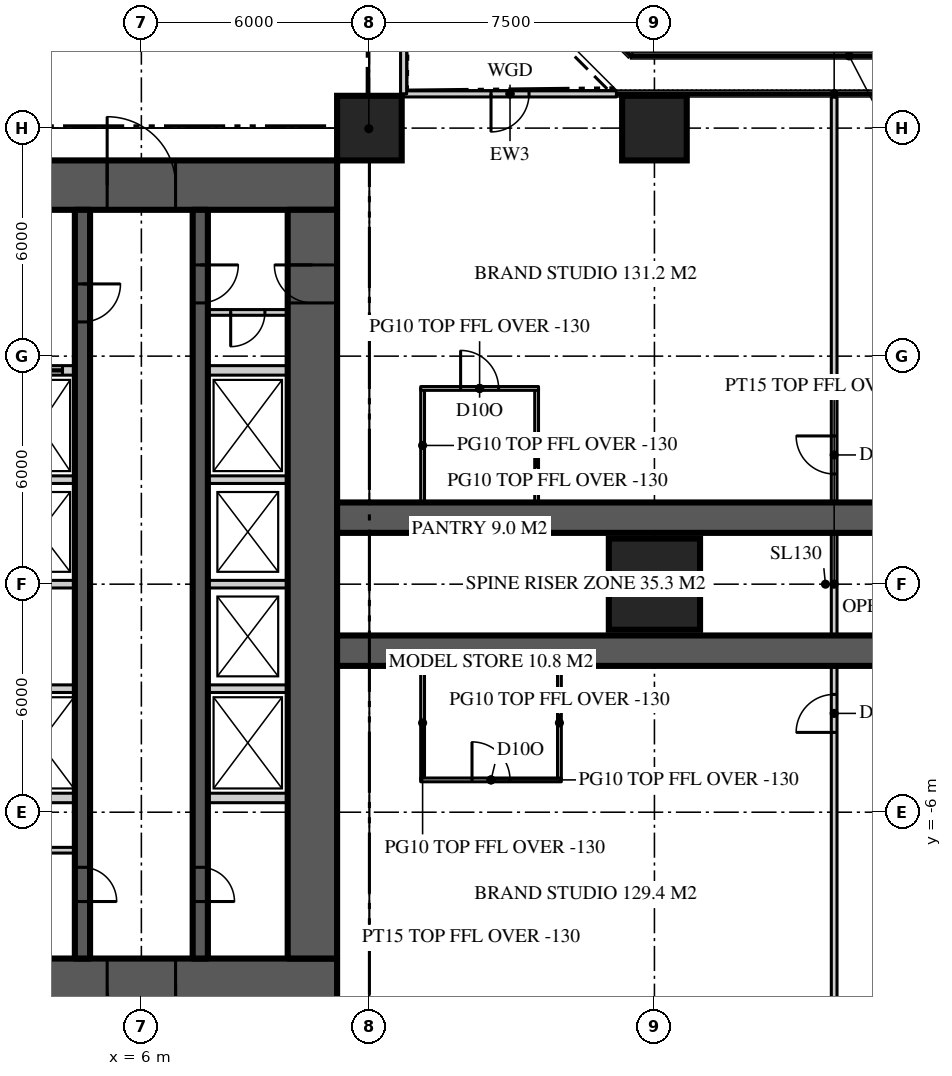
"""IFC4 building model, lengths in metres.
Left out: names, types, materials, properties, quantities, classifications, styles, units other than length and angle.
Written with IfcOpenShell. Run it as: python <this file> out.ifc"""

import sys

from ifc_helpers import new_model, si_unit, direction, frame, frame_2d, origin, origin_2d, place, context, subcontext, project, spatial, rectangle, extrude, element, fill, save


model = new_model("IFC4")
c1 = context("Model", 3, precision=1e-05, world=origin(), true_north=direction((0.0, 1.0)))
c2 = subcontext(c1, "Body", "Model", "MODEL_VIEW")
j1 = project(units=[si_unit("LENGTHUNIT", "METRE"), si_unit("PLANEANGLEUNIT", "RADIAN")], contexts=[c1])
p1 = place(None, origin())
s1 = spatial("IfcSite", under=j1, at=p1, CompositionType="ELEMENT")
p2 = place(p1, origin())
s2 = spatial("IfcBuilding", under=s1, at=p2, CompositionType="ELEMENT")
p3 = place(p2, frame((0.0, 0.0, 190.5)))
s3 = spatial("IfcBuildingStorey", under=s2, at=p3, CompositionType="ELEMENT", Elevation=190.5)
p4 = place(p3, frame((-11.15, 10.5, 0.0), z_axis=(0.0, 0.0, 1.0), x_axis=(1.0, 0.0, 0.0)))
e1 = element("IfcWall", 1, at=p4, inside=s3, PredefinedType="SHEAR", context=c2, shape_type="SweptSolid", body=[
    extrude(rectangle(XDim=22.3, YDim=1.3, at=frame_2d((11.15, 0.0))), origin(), (0.0, 0.0, 1.0), 3.9),
])
p5 = place(p4, frame((4.25, 0.0, 0.0)))
e2 = element("IfcOpeningElement", 2, at=p5, cuts=e1, PredefinedType="OPENING", context=c2, shape_type="SweptSolid", body=[
    extrude(rectangle(XDim=1.8, YDim=2.2, at=frame_2d((0.9, 1.1))), frame((0.0, 0.66, 0.0), z_axis=(0.0, -1.0, 0.0), x_axis=(1.0, 0.0, 0.0)), (0.0, 0.0, 1.0), 1.32),
])
p6 = place(p4, frame((16.25, 0.0, 0.0)))
e3 = element("IfcOpeningElement", 3, at=p6, cuts=e1, PredefinedType="OPENING", context=c2, shape_type="SweptSolid", body=[
    extrude(rectangle(XDim=1.8, YDim=2.2, at=frame_2d((0.9, 1.1))), frame((0.0, 0.66, 0.0), z_axis=(0.0, -1.0, 0.0), x_axis=(1.0, 0.0, 0.0)), (0.0, 0.0, 1.0), 1.32),
])
p7 = place(p3, frame((11.15, -10.5, 0.0), z_axis=(0.0, 0.0, 1.0), x_axis=(-1.0, 0.0, 0.0)))
e4 = element("IfcWall", 4, at=p7, inside=s3, PredefinedType="SHEAR", context=c2, shape_type="SweptSolid", body=[
    extrude(rectangle(XDim=22.3, YDim=1.3, at=frame_2d((11.15, 0.0))), origin(), (0.0, 0.0, 1.0), 3.9),
])
p8 = place(p7, frame((16.25, 0.0, 0.0)))
e5 = element("IfcOpeningElement", 5, at=p8, cuts=e4, PredefinedType="OPENING", context=c2, shape_type="SweptSolid", body=[
    extrude(rectangle(XDim=1.8, YDim=2.2, at=frame_2d((0.9, 1.1))), frame((0.0, 0.66, 0.0), z_axis=(0.0, -1.0, 0.0), x_axis=(1.0, 0.0, 0.0)), (0.0, 0.0, 1.0), 1.32),
])
p9 = place(p7, frame((4.25, 0.0, 0.0)))
e6 = element("IfcOpeningElement", 6, at=p9, cuts=e4, PredefinedType="OPENING", context=c2, shape_type="SweptSolid", body=[
    extrude(rectangle(XDim=1.8, YDim=2.2, at=frame_2d((0.9, 1.1))), frame((0.0, 0.66, 0.0), z_axis=(0.0, -1.0, 0.0), x_axis=(1.0, 0.0, 0.0)), (0.0, 0.0, 1.0), 1.32),
])
p10 = place(p3, frame((10.5, -9.85, 0.0), z_axis=(0.0, 0.0, 1.0), x_axis=(0.0, 1.0, 0.0)))
e7 = element("IfcWall", 7, at=p10, inside=s3, PredefinedType="SHEAR", context=c2, shape_type="SweptSolid", body=[
    extrude(rectangle(XDim=19.7, YDim=1.3, at=frame_2d((9.85, 0.0))), origin(), (0.0, 0.0, 1.0), 3.9),
])
p11 = place(p10, frame((17.25, 0.0, 0.0)))
e8 = element("IfcOpeningElement", 8, at=p11, cuts=e7, PredefinedType="OPENING", context=c2, shape_type="SweptSolid", body=[
    extrude(rectangle(XDim=1.0, YDim=2.2, at=frame_2d((0.5, 1.1))), frame((0.0, 0.66, 0.0), z_axis=(0.0, -1.0, 0.0), x_axis=(1.0, 0.0, 0.0)), (0.0, 0.0, 1.0), 1.32),
])
for number, where, z_axis, x_axis in (
    (9, (11.15, -1.75, 0.0), (0.0, 0.0, 1.0), (1.0, 0.0, 0.0)),
    (10, (11.15, 1.75, 0.0), (0.0, 0.0, 1.0), (1.0, 0.0, 0.0)),
):
    element("IfcWall", number, at=place(p3, frame(where, z_axis=z_axis, x_axis=x_axis)), inside=s3, PredefinedType="SHEAR", context=c2, shape_type="SweptSolid", body=[
        extrude(rectangle(XDim=15.25, YDim=0.8, at=frame_2d((7.625, 0.0))), origin(), (0.0, 0.0, 1.0), 3.9),
    ])
p12 = place(p3, frame((19.5, 0.0, 0.0), z_axis=(0.0, 0.0, 1.0), x_axis=(1.0, 0.0, 0.0)))
e11 = element("IfcColumn", 11, at=p12, inside=s3, PredefinedType="COLUMN", context=c2, shape_type="SweptSolid", body=[
    extrude(rectangle(XDim=2.4, YDim=2.4, at=origin_2d()), origin(), (0.0, 0.0, 1.0), 3.9),
])
for number, where, z_axis, x_axis in (
    (12, (12.0, 12.0, 0.0), (0.0, 0.0, 1.0), (1.0, 0.0, 0.0)),
    (13, (19.5, 12.0, 0.0), (0.0, 0.0, 1.0), (1.0, 0.0, 0.0)),
):
    element("IfcColumn", number, at=place(p3, frame(where, z_axis=z_axis, x_axis=x_axis)), inside=s3, PredefinedType="COLUMN", context=c2, shape_type="SweptSolid", body=[
        extrude(rectangle(XDim=1.7, YDim=1.7, at=origin_2d()), origin(), (0.0, 0.0, 1.0), 3.9),
    ])
p13 = place(p3, frame((18.5, 12.9, 0.0), z_axis=(0.0, 0.0, 1.0), x_axis=(-1.0, 0.0, 0.0)))
e14 = element("IfcWall", 14, at=p13, inside=s3, PredefinedType="SOLIDWALL", context=c2, shape_type="SweptSolid", body=[
    extrude(rectangle(XDim=5.6, YDim=0.16, at=frame_2d((2.8, 0.0))), origin(), (0.0, 0.0, 1.0), 3.77),
])
p14 = place(p13, frame((2.3, 0.0, 0.0)))
e15 = element("IfcOpeningElement", 15, at=p14, cuts=e14, PredefinedType="OPENING", context=c2, shape_type="SweptSolid", body=[
    extrude(rectangle(XDim=1.0, YDim=2.2, at=frame_2d((0.5, 1.1))), frame((0.0, 0.09, 0.0), z_axis=(0.0, -1.0, 0.0), x_axis=(1.0, 0.0, 0.0)), (0.0, 0.0, 1.0), 0.18),
])
p15 = place(p3, frame((12.9, 12.9, 0.0), z_axis=(0.0, 0.0, 1.0), x_axis=(0.0, 1.0, 0.0)))
e16 = element("IfcWall", 16, at=p15, inside=s3, PredefinedType="SOLIDWALL", context=c2, shape_type="SweptSolid", body=[
    extrude(rectangle(XDim=5.6, YDim=0.16, at=frame_2d((2.8, 0.0))), origin(), (0.0, 0.0, 1.0), 3.77),
])
p16 = place(p3, frame((7.55, 9.85, 0.0), z_axis=(0.0, 0.0, 1.0), x_axis=(0.0, -1.0, 0.0)))
e17 = element("IfcWall", 17, at=p16, inside=s3, PredefinedType="SHEAR", context=c2, shape_type="SweptSolid", body=[
    extrude(rectangle(XDim=19.7, YDim=0.4, at=frame_2d((9.85, 0.0))), origin(), (0.0, 0.0, 1.0), 3.9),
])
p17 = place(p16, frame((1.45, 0.0, 0.0)))
e18 = element("IfcOpeningElement", 18, at=p17, cuts=e17, PredefinedType="OPENING", context=c2, shape_type="SweptSolid", body=[
    extrude(rectangle(XDim=1.0, YDim=2.2, at=frame_2d((0.5, 1.1))), frame((0.0, 0.21, 0.0), z_axis=(0.0, -1.0, 0.0), x_axis=(1.0, 0.0, 0.0)), (0.0, 0.0, 1.0), 0.42),
])
p18 = place(p16, frame((17.3, 0.0, 0.0)))
e19 = element("IfcOpeningElement", 19, at=p18, cuts=e17, PredefinedType="OPENING", context=c2, shape_type="SweptSolid", body=[
    extrude(rectangle(XDim=0.9, YDim=2.1, at=frame_2d((0.45, 1.05))), frame((0.0, 0.21, 0.0), z_axis=(0.0, -1.0, 0.0), x_axis=(1.0, 0.0, 0.0)), (0.0, 0.0, 1.0), 0.42),
])
p19 = place(p3, frame((4.45, 9.85, 0.0), z_axis=(0.0, 0.0, 1.0), x_axis=(0.0, -1.0, 0.0)))
e20 = element("IfcWall", 20, at=p19, inside=s3, PredefinedType="SHEAR", context=c2, shape_type="SweptSolid", body=[
    extrude(rectangle(XDim=19.7, YDim=0.4, at=frame_2d((9.85, 0.0))), origin(), (0.0, 0.0, 1.0), 3.9),
])
p20 = place(p19, frame((1.95, 0.0, 0.0)))
e21 = element("IfcOpeningElement", 21, at=p20, cuts=e20, PredefinedType="OPENING", context=c2, shape_type="SweptSolid", body=[
    extrude(rectangle(XDim=1.0, YDim=2.2, at=frame_2d((0.5, 1.1))), frame((0.0, 0.21, 0.0), z_axis=(0.0, -1.0, 0.0), x_axis=(1.0, 0.0, 0.0)), (0.0, 0.0, 1.0), 0.42),
])
p21 = place(p19, frame((17.3, 0.0, 0.0)))
e22 = element("IfcOpeningElement", 22, at=p21, cuts=e20, PredefinedType="OPENING", context=c2, shape_type="SweptSolid", body=[
    extrude(rectangle(XDim=0.9, YDim=2.1, at=frame_2d((0.45, 1.05))), frame((0.0, 0.21, 0.0), z_axis=(0.0, -1.0, 0.0), x_axis=(1.0, 0.0, 0.0)), (0.0, 0.0, 1.0), 0.42),
])
p22 = place(p3, frame((2.4, 5.625, 0.0), z_axis=(0.0, 0.0, 1.0), x_axis=(1.0, 0.0, 0.0)))
e23 = element("IfcWall", 23, at=p22, inside=s3, PredefinedType="SOLIDWALL", context=c2, shape_type="SweptSolid", body=[
    extrude(rectangle(XDim=1.85, YDim=0.25, at=frame_2d((0.925, 0.0))), origin(), (0.0, 0.0, 1.0), 3.7),
])
p23 = place(p22, frame((0.325, 0.0, 0.0)))
e24 = element("IfcOpeningElement", 24, at=p23, cuts=e23, PredefinedType="OPENING", context=c2, shape_type="SweptSolid", body=[
    extrude(rectangle(XDim=1.2, YDim=2.2, at=frame_2d((0.6, 1.1))), frame((0.0, 0.135, 0.0), z_axis=(0.0, -1.0, 0.0), x_axis=(1.0, 0.0, 0.0)), (0.0, 0.0, 1.0), 0.27),
])
p24 = place(p3, frame((7.75, 5.625, 0.0), z_axis=(0.0, 0.0, 1.0), x_axis=(1.0, 0.0, 0.0)))
e25 = element("IfcWall", 25, at=p24, inside=s3, PredefinedType="SOLIDWALL", context=c2, shape_type="SweptSolid", body=[
    extrude(rectangle(XDim=2.1, YDim=0.25, at=frame_2d((1.05, 0.0))), origin(), (0.0, 0.0, 1.0), 3.7),
])
p25 = place(p3, frame((2.4, -5.625, 0.0), z_axis=(0.0, 0.0, 1.0), x_axis=(1.0, 0.0, 0.0)))
e26 = element("IfcWall", 26, at=p25, inside=s3, PredefinedType="SOLIDWALL", context=c2, shape_type="SweptSolid", body=[
    extrude(rectangle(XDim=1.85, YDim=0.25, at=frame_2d((0.925, 0.0))), origin(), (0.0, 0.0, 1.0), 3.7),
])
p26 = place(p3, frame((7.75, -5.625, 0.0), z_axis=(0.0, 0.0, 1.0), x_axis=(1.0, 0.0, 0.0)))
e27 = element("IfcWall", 27, at=p26, inside=s3, PredefinedType="SOLIDWALL", context=c2, shape_type="SweptSolid", body=[
    extrude(rectangle(XDim=2.1, YDim=0.25, at=frame_2d((1.05, 0.0))), origin(), (0.0, 0.0, 1.0), 3.7),
])
p27 = place(p3, frame((2.4, -2.75, 0.0), z_axis=(0.0, 0.0, 1.0), x_axis=(1.0, 0.0, 0.0)))
e28 = element("IfcWall", 28, at=p27, inside=s3, PredefinedType="SOLIDWALL", context=c2, shape_type="SweptSolid", body=[
    extrude(rectangle(XDim=1.85, YDim=0.2, at=frame_2d((0.925, 0.0))), origin(), (0.0, 0.0, 1.0), 3.7),
])
p28 = place(p3, frame((7.75, -2.75, 0.0), z_axis=(0.0, 0.0, 1.0), x_axis=(1.0, 0.0, 0.0)))
e29 = element("IfcWall", 29, at=p28, inside=s3, PredefinedType="SOLIDWALL", context=c2, shape_type="SweptSolid", body=[
    extrude(rectangle(XDim=2.1, YDim=0.2, at=frame_2d((1.05, 0.0))), origin(), (0.0, 0.0, 1.0), 3.7),
])
p29 = place(p3, frame((2.4, 0.0, 0.0), z_axis=(0.0, 0.0, 1.0), x_axis=(1.0, 0.0, 0.0)))
e30 = element("IfcWall", 30, at=p29, inside=s3, PredefinedType="SOLIDWALL", context=c2, shape_type="SweptSolid", body=[
    extrude(rectangle(XDim=1.85, YDim=0.2, at=frame_2d((0.925, 0.0))), origin(), (0.0, 0.0, 1.0), 3.7),
])
p30 = place(p3, frame((7.75, 0.0, 0.0), z_axis=(0.0, 0.0, 1.0), x_axis=(1.0, 0.0, 0.0)))
e31 = element("IfcWall", 31, at=p30, inside=s3, PredefinedType="SOLIDWALL", context=c2, shape_type="SweptSolid", body=[
    extrude(rectangle(XDim=2.1, YDim=0.2, at=frame_2d((1.05, 0.0))), origin(), (0.0, 0.0, 1.0), 3.7),
])
p31 = place(p3, frame((2.4, 2.75, 0.0), z_axis=(0.0, 0.0, 1.0), x_axis=(1.0, 0.0, 0.0)))
e32 = element("IfcWall", 32, at=p31, inside=s3, PredefinedType="SOLIDWALL", context=c2, shape_type="SweptSolid", body=[
    extrude(rectangle(XDim=1.85, YDim=0.2, at=frame_2d((0.925, 0.0))), origin(), (0.0, 0.0, 1.0), 3.7),
])
p32 = place(p3, frame((7.75, 2.75, 0.0), z_axis=(0.0, 0.0, 1.0), x_axis=(1.0, 0.0, 0.0)))
e33 = element("IfcWall", 33, at=p32, inside=s3, PredefinedType="SOLIDWALL", context=c2, shape_type="SweptSolid", body=[
    extrude(rectangle(XDim=2.1, YDim=0.2, at=frame_2d((1.05, 0.0))), origin(), (0.0, 0.0, 1.0), 3.7),
])
p33 = place(p3, frame((24.229, -12.82, 0.0), z_axis=(0.0, 0.0, 1.0), x_axis=(0.0, 1.0, 0.0)))
e34 = element("IfcWall", 34, at=p33, inside=s3, PredefinedType="PARTITIONING", context=c2, shape_type="SweptSolid", body=[
    extrude(rectangle(XDim=25.64, YDim=0.15, at=frame_2d((12.82, 0.0))), origin(), (0.0, 0.0, 1.0), 3.77),
])
p34 = place(p33, frame((15.72, 0.0, 0.0)))
e35 = element("IfcOpeningElement", 35, at=p34, cuts=e34, PredefinedType="OPENING", context=c2, shape_type="SweptSolid", body=[
    extrude(rectangle(XDim=1.0, YDim=2.2, at=frame_2d((0.5, 1.1))), frame((0.0, 0.085, 0.0), z_axis=(0.0, -1.0, 0.0), x_axis=(1.0, 0.0, 0.0)), (0.0, 0.0, 1.0), 0.17),
])
p35 = place(p33, frame((8.92, 0.0, 0.0)))
e36 = element("IfcOpeningElement", 36, at=p35, cuts=e34, PredefinedType="OPENING", context=c2, shape_type="SweptSolid", body=[
    extrude(rectangle(XDim=1.0, YDim=2.2, at=frame_2d((0.5, 1.1))), frame((0.0, 0.085, 0.0), z_axis=(0.0, -1.0, 0.0), x_axis=(1.0, 0.0, 0.0)), (0.0, 0.0, 1.0), 0.17),
])
for number, where, z_axis, x_axis in (
    (37, (13.4, 2.15, 0.0), (0.0, 0.0, 1.0), (0.0, 1.0, 0.0)),
    (38, (16.4, 2.15, 0.0), (0.0, 0.0, 1.0), (0.0, 1.0, 0.0)),
):
    element("IfcWall", number, at=place(p3, frame(where, z_axis=z_axis, x_axis=x_axis)), inside=s3, PredefinedType="PARTITIONING", context=c2, shape_type="SweptSolid", body=[
        extrude(rectangle(XDim=3.0, YDim=0.1, at=frame_2d((1.5, 0.0))), origin(), (0.0, 0.0, 1.0), 3.77),
    ])
p36 = place(p3, frame((13.35, 5.15, 0.0), z_axis=(0.0, 0.0, 1.0), x_axis=(1.0, 0.0, 0.0)))
e39 = element("IfcWall", 39, at=p36, inside=s3, PredefinedType="PARTITIONING", context=c2, shape_type="SweptSolid", body=[
    extrude(rectangle(XDim=3.1, YDim=0.1, at=frame_2d((1.55, 0.0))), origin(), (0.0, 0.0, 1.0), 3.77),
])
p37 = place(p36, frame((1.05, 0.0, 0.0)))
e40 = element("IfcOpeningElement", 40, at=p37, cuts=e39, PredefinedType="OPENING", context=c2, shape_type="SweptSolid", body=[
    extrude(rectangle(XDim=1.0, YDim=2.2, at=frame_2d((0.5, 1.1))), frame((0.0, 0.06, 0.0), z_axis=(0.0, -1.0, 0.0), x_axis=(1.0, 0.0, 0.0)), (0.0, 0.0, 1.0), 0.12),
])
for number, where, z_axis, x_axis in (
    (41, (13.4, -2.15, 0.0), (0.0, 0.0, 1.0), (0.0, -1.0, 0.0)),
    (42, (17.0, -2.15, 0.0), (0.0, 0.0, 1.0), (0.0, -1.0, 0.0)),
):
    element("IfcWall", number, at=place(p3, frame(where, z_axis=z_axis, x_axis=x_axis)), inside=s3, PredefinedType="PARTITIONING", context=c2, shape_type="SweptSolid", body=[
        extrude(rectangle(XDim=3.0, YDim=0.1, at=frame_2d((1.5, 0.0))), origin(), (0.0, 0.0, 1.0), 3.77),
    ])
p38 = place(p3, frame((13.35, -5.15, 0.0), z_axis=(0.0, 0.0, 1.0), x_axis=(1.0, 0.0, 0.0)))
e43 = element("IfcWall", 43, at=p38, inside=s3, PredefinedType="PARTITIONING", context=c2, shape_type="SweptSolid", body=[
    extrude(rectangle(XDim=3.7, YDim=0.1, at=frame_2d((1.85, 0.0))), origin(), (0.0, 0.0, 1.0), 3.77),
])
p39 = place(p38, frame((1.35, 0.0, 0.0)))
e44 = element("IfcOpeningElement", 44, at=p39, cuts=e43, PredefinedType="OPENING", context=c2, shape_type="SweptSolid", body=[
    extrude(rectangle(XDim=1.0, YDim=2.2, at=frame_2d((0.5, 1.1))), frame((0.0, 0.06, 0.0), z_axis=(0.0, -1.0, 0.0), x_axis=(1.0, 0.0, 0.0)), (0.0, 0.0, 1.0), 0.12),
])
p40 = place(p3, frame((11.15, 11.15, 0.0), z_axis=(0.0, 0.0, 1.0), x_axis=(0.707106781187, 0.707106781187, 0.0)))
e45 = element("IfcWall", 45, at=p40, inside=s3, PredefinedType="PARTITIONING", context=c2, shape_type="SweptSolid", body=[
    extrude(rectangle(XDim=2.362, YDim=0.15, at=frame_2d((1.181, 0.0))), origin(), (0.0, 0.0, 1.0), 3.77),
])
p41 = place(p3, frame((2.4, -7.0, 0.0), z_axis=(0.0, 0.0, 1.0), x_axis=(1.0, 0.0, 0.0)))
e46 = element("IfcWall", 46, at=p41, inside=s3, PredefinedType="SOLIDWALL", context=c2, shape_type="SweptSolid", body=[
    extrude(rectangle(XDim=1.85, YDim=0.15, at=frame_2d((0.925, 0.0))), origin(), (0.0, 0.0, 1.0), 3.77),
])
p42 = place(p41, frame((0.1, 0.0, 0.0)))
e47 = element("IfcOpeningElement", 47, at=p42, cuts=e46, PredefinedType="OPENING", context=c2, shape_type="SweptSolid", body=[
    extrude(rectangle(XDim=0.9, YDim=2.1, at=frame_2d((0.45, 1.05))), frame((0.0, 0.085, 0.0), z_axis=(0.0, -1.0, 0.0), x_axis=(1.0, 0.0, 0.0)), (0.0, 0.0, 1.0), 0.17),
])
p43 = place(p3, frame((9.85, 7.15, 0.0), z_axis=(0.0, 0.0, 1.0), x_axis=(-1.0, 0.0, 0.0)))
e48 = element("IfcWall", 48, at=p43, inside=s3, PredefinedType="SOLIDWALL", context=c2, shape_type="SweptSolid", body=[
    extrude(rectangle(XDim=2.1, YDim=0.15, at=frame_2d((1.05, 0.0))), origin(), (0.0, 0.0, 1.0), 3.77),
])
p44 = place(p43, frame((0.6, 0.0, 0.0)))
e49 = element("IfcOpeningElement", 49, at=p44, cuts=e48, PredefinedType="OPENING", context=c2, shape_type="SweptSolid", body=[
    extrude(rectangle(XDim=0.9, YDim=2.1, at=frame_2d((0.45, 1.05))), frame((0.0, 0.085, 0.0), z_axis=(0.0, -1.0, 0.0), x_axis=(1.0, 0.0, 0.0)), (0.0, 0.0, 1.0), 0.17),
])
p45 = place(p14, origin())
e50 = element("IfcDoor", 50, at=p45, inside=s3, OperationType="SINGLE_SWING_RIGHT", PredefinedType="DOOR", context=c2, shape_type="SweptSolid", body=[
    extrude(rectangle(XDim=1.0, YDim=2.2, at=frame_2d((0.5, 1.1))), frame((0.0, 0.025, 0.0), z_axis=(0.0, -1.0, 0.0), x_axis=(1.0, 0.0, 0.0)), (0.0, 0.0, 1.0), 0.05),
])
fill(e15, e50)
p46 = place(p6, origin())
e51 = element("IfcDoor", 51, at=p46, inside=s3, OperationType="DOUBLE_DOOR_DOUBLE_SWING", PredefinedType="DOOR", context=c2, shape_type="SweptSolid", body=[
    extrude(rectangle(XDim=1.8, YDim=2.2, at=frame_2d((0.9, 1.1))), frame((0.0, 0.025, 0.0), z_axis=(0.0, -1.0, 0.0), x_axis=(1.0, 0.0, 0.0)), (0.0, 0.0, 1.0), 0.05),
])
fill(e3, e51)
p47 = place(p9, origin())
e52 = element("IfcDoor", 52, at=p47, inside=s3, OperationType="DOUBLE_DOOR_DOUBLE_SWING", PredefinedType="DOOR", context=c2, shape_type="SweptSolid", body=[
    extrude(rectangle(XDim=1.8, YDim=2.2, at=frame_2d((0.9, 1.1))), frame((0.0, 0.025, 0.0), z_axis=(0.0, -1.0, 0.0), x_axis=(1.0, 0.0, 0.0)), (0.0, 0.0, 1.0), 0.05),
])
fill(e6, e52)
p48 = place(p17, origin())
e53 = element("IfcDoor", 53, at=p48, inside=s3, OperationType="SINGLE_SWING_LEFT", PredefinedType="DOOR", context=c2, shape_type="SweptSolid", body=[
    extrude(rectangle(XDim=1.0, YDim=2.2, at=frame_2d((0.5, 1.1))), frame((0.0, 0.025, 0.0), z_axis=(0.0, -1.0, 0.0), x_axis=(1.0, 0.0, 0.0)), (0.0, 0.0, 1.0), 0.05),
])
fill(e18, e53)
p49 = place(p11, origin())
e54 = element("IfcDoor", 54, at=p49, inside=s3, OperationType="SINGLE_SWING_RIGHT", PredefinedType="DOOR", context=c2, shape_type="SweptSolid", body=[
    extrude(rectangle(XDim=1.0, YDim=2.2, at=frame_2d((0.5, 1.1))), frame((0.0, 0.025, 0.0), z_axis=(0.0, -1.0, 0.0), x_axis=(1.0, 0.0, 0.0)), (0.0, 0.0, 1.0), 0.05),
])
fill(e8, e54)
p50 = place(p20, origin())
e55 = element("IfcDoor", 55, at=p50, inside=s3, OperationType="SINGLE_SWING_LEFT", PredefinedType="DOOR", context=c2, shape_type="SweptSolid", body=[
    extrude(rectangle(XDim=1.0, YDim=2.2, at=frame_2d((0.5, 1.1))), frame((0.0, 0.025, 0.0), z_axis=(0.0, -1.0, 0.0), x_axis=(1.0, 0.0, 0.0)), (0.0, 0.0, 1.0), 0.05),
])
fill(e21, e55)
p51 = place(p18, origin())
e56 = element("IfcDoor", 56, at=p51, inside=s3, OperationType="SINGLE_SWING_RIGHT", PredefinedType="DOOR", context=c2, shape_type="SweptSolid", body=[
    extrude(rectangle(XDim=0.9, YDim=2.1, at=frame_2d((0.45, 1.05))), frame((0.0, 0.025, 0.0), z_axis=(0.0, -1.0, 0.0), x_axis=(1.0, 0.0, 0.0)), (0.0, 0.0, 1.0), 0.05),
])
fill(e19, e56)
p52 = place(p21, origin())
e57 = element("IfcDoor", 57, at=p52, inside=s3, OperationType="SINGLE_SWING_RIGHT", PredefinedType="DOOR", context=c2, shape_type="SweptSolid", body=[
    extrude(rectangle(XDim=0.9, YDim=2.1, at=frame_2d((0.45, 1.05))), frame((0.0, 0.025, 0.0), z_axis=(0.0, -1.0, 0.0), x_axis=(1.0, 0.0, 0.0)), (0.0, 0.0, 1.0), 0.05),
])
fill(e22, e57)
p53 = place(p23, origin())
e58 = element("IfcDoor", 58, at=p53, inside=s3, OperationType="SLIDING_TO_LEFT", PredefinedType="DOOR", context=c2, shape_type="SweptSolid", body=[
    extrude(rectangle(XDim=1.2, YDim=2.2, at=frame_2d((0.6, 1.1))), frame((0.0, 0.025, 0.0), z_axis=(0.0, -1.0, 0.0), x_axis=(1.0, 0.0, 0.0)), (0.0, 0.0, 1.0), 0.05),
])
fill(e24, e58)
p54 = place(p34, origin())
e59 = element("IfcDoor", 59, at=p54, inside=s3, OperationType="SINGLE_SWING_RIGHT", PredefinedType="DOOR", context=c2, shape_type="SweptSolid", body=[
    extrude(rectangle(XDim=1.0, YDim=2.2, at=frame_2d((0.5, 1.1))), frame((0.0, 0.025, 0.0), z_axis=(0.0, -1.0, 0.0), x_axis=(1.0, 0.0, 0.0)), (0.0, 0.0, 1.0), 0.05),
])
fill(e35, e59)
p55 = place(p35, origin())
e60 = element("IfcDoor", 60, at=p55, inside=s3, OperationType="SINGLE_SWING_LEFT", PredefinedType="DOOR", context=c2, shape_type="SweptSolid", body=[
    extrude(rectangle(XDim=1.0, YDim=2.2, at=frame_2d((0.5, 1.1))), frame((0.0, 0.025, 0.0), z_axis=(0.0, -1.0, 0.0), x_axis=(1.0, 0.0, 0.0)), (0.0, 0.0, 1.0), 0.05),
])
fill(e36, e60)
p56 = place(p37, origin())
e61 = element("IfcDoor", 61, at=p56, inside=s3, OperationType="SINGLE_SWING_LEFT", PredefinedType="DOOR", context=c2, shape_type="SweptSolid", body=[
    extrude(rectangle(XDim=1.0, YDim=2.2, at=frame_2d((0.5, 1.1))), frame((0.0, 0.025, 0.0), z_axis=(0.0, -1.0, 0.0), x_axis=(1.0, 0.0, 0.0)), (0.0, 0.0, 1.0), 0.05),
])
fill(e40, e61)
p57 = place(p39, origin())
e62 = element("IfcDoor", 62, at=p57, inside=s3, OperationType="SINGLE_SWING_LEFT", PredefinedType="DOOR", context=c2, shape_type="SweptSolid", body=[
    extrude(rectangle(XDim=1.0, YDim=2.2, at=frame_2d((0.5, 1.1))), frame((0.0, 0.025, 0.0), z_axis=(0.0, -1.0, 0.0), x_axis=(1.0, 0.0, 0.0)), (0.0, 0.0, 1.0), 0.05),
])
fill(e44, e62)
p58 = place(p44, origin())
e63 = element("IfcDoor", 63, at=p58, inside=s3, OperationType="SINGLE_SWING_RIGHT", PredefinedType="DOOR", context=c2, shape_type="SweptSolid", body=[
    extrude(rectangle(XDim=0.9, YDim=2.1, at=frame_2d((0.45, 1.05))), frame((0.0, 0.025, 0.0), z_axis=(0.0, -1.0, 0.0), x_axis=(1.0, 0.0, 0.0)), (0.0, 0.0, 1.0), 0.05),
])
fill(e49, e63)
save(model, sys.argv[1])
